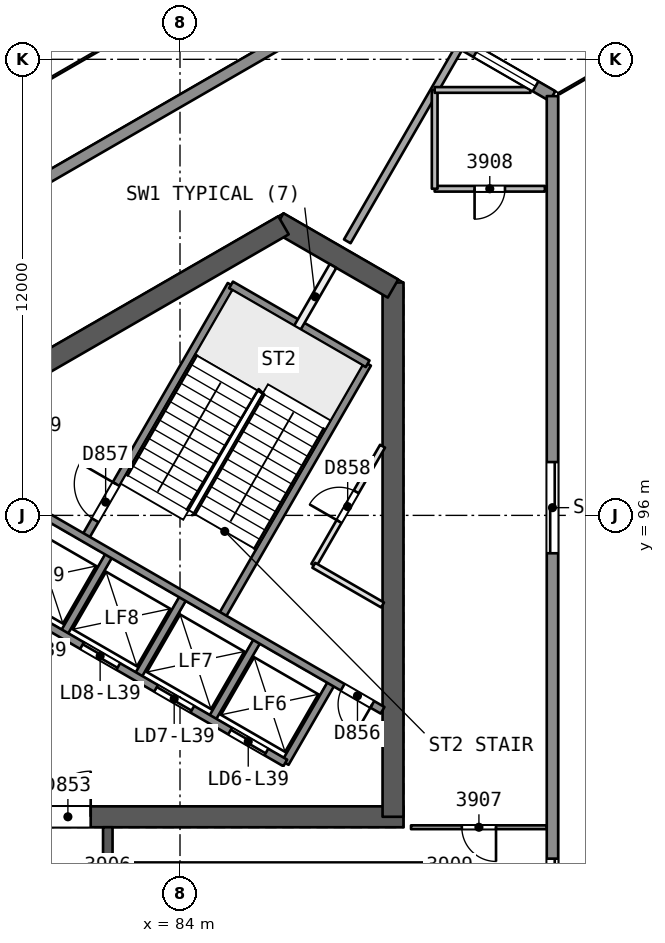
"""IFC4 building model, lengths in metres.
Left out: names, types, materials, properties, quantities, classifications, styles, units other than length and angle.
Written with IfcOpenShell. Run it as: python <this file> out.ifc"""

import sys

from ifc_helpers import new_model, si_unit, direction, frame, frame_2d, origin, place, context, subcontext, project, spatial, rectangle, extrude, element, fill, save


model = new_model("IFC4")
c1 = context("Model", 3, precision=1e-05, world=origin(), true_north=direction((0.0, 1.0)))
c2 = subcontext(c1, "Body", "Model", "MODEL_VIEW")
j1 = project(units=[si_unit("LENGTHUNIT", "METRE"), si_unit("PLANEANGLEUNIT", "RADIAN")], contexts=[c1])
p1 = place(None, origin())
s1 = spatial("IfcSite", under=j1, at=p1, CompositionType="ELEMENT")
p2 = place(p1, origin())
s2 = spatial("IfcBuilding", under=s1, at=p2, CompositionType="ELEMENT")
p3 = place(p2, frame((0.0, 0.0, 163.7)))
s3 = spatial("IfcBuildingStorey", under=s2, at=p3, CompositionType="ELEMENT", Elevation=163.7)
p4 = place(p3, frame((79.659, 88.069, 0.0), z_axis=(0.0, 0.0, 1.0), x_axis=(1.0, 0.0, 0.0)))
e1 = element("IfcWall", 1, at=p4, inside=s3, PredefinedType="SHEAR", context=c2, shape_type="SweptSolid", body=[
    extrude(rectangle(XDim=10.221, YDim=0.55, at=frame_2d((5.111, 0.0))), origin(), (0.0, 0.0, 1.0), 3.7),
])
p5 = place(p4, frame((0.791, 0.0, 0.0)))
e2 = element("IfcOpeningElement", 2, at=p5, cuts=e1, PredefinedType="OPENING", context=c2, shape_type="SweptSolid", body=[
    extrude(rectangle(XDim=1.2, YDim=2.1, at=frame_2d((0.6, 1.05))), frame((0.0, 0.286, 0.0), z_axis=(0.0, -1.0, 0.0), x_axis=(1.0, 0.0, 0.0)), (0.0, 0.0, 1.0), 0.571),
])
p6 = place(p3, frame((89.605, 88.069, 0.0), z_axis=(0.0, 0.0, 1.0), x_axis=(0.0, 1.0, 0.0)))
e3 = element("IfcWall", 3, at=p6, inside=s3, PredefinedType="SHEAR", context=c2, shape_type="SweptSolid", body=[
    extrude(rectangle(XDim=14.058, YDim=0.55, at=frame_2d((7.029, 0.0))), origin(), (0.0, 0.0, 1.0), 3.7),
])
p7 = place(p3, frame((89.605, 101.969, 0.0), z_axis=(0.0, 0.0, 1.0), x_axis=(-0.865997833373, 0.500047750313, 0.0)))
e4 = element("IfcWall", 4, at=p7, inside=s3, PredefinedType="SHEAR", context=c2, shape_type="SweptSolid", body=[
    extrude(rectangle(XDim=3.487, YDim=0.55, at=frame_2d((1.743, 0.0))), origin(), (0.0, 0.0, 1.0), 3.7),
])
p8 = place(p3, frame((86.723, 103.633, 0.0), z_axis=(0.0, 0.0, 1.0), x_axis=(-0.866023530946, -0.500003243837, 0.0)))
e5 = element("IfcWall", 5, at=p8, inside=s3, PredefinedType="SHEAR", context=c2, shape_type="SweptSolid", body=[
    extrude(rectangle(XDim=14.175, YDim=0.55, at=frame_2d((7.087, 0.0))), origin(), (0.0, 0.0, 1.0), 3.7),
])
p9 = place(p3, frame((82.1, 72.206, 0.0), z_axis=(0.0, 0.0, 1.0), x_axis=(0.0, 1.0, 0.0)))
e6 = element("IfcWall", 6, at=p9, inside=s3, PredefinedType="SHEAR", context=c2, shape_type="SweptSolid", body=[
    extrude(rectangle(XDim=15.588, YDim=0.25, at=frame_2d((7.794, 0.0))), origin(), (0.0, 0.0, 1.0), 3.25),
])
p10 = place(p9, frame((2.618, 0.0, 0.0)))
e7 = element("IfcOpeningElement", 7, at=p10, cuts=e6, PredefinedType="OPENING", context=c2, shape_type="SweptSolid", body=[
    extrude(rectangle(XDim=1.0, YDim=2.1, at=frame_2d((0.5, 1.05))), frame((0.0, 0.135, 0.0), z_axis=(0.0, -1.0, 0.0), x_axis=(1.0, 0.0, 0.0)), (0.0, 0.0, 1.0), 0.271),
])
p11 = place(p9, frame((8.285, 0.0, 0.0)))
e8 = element("IfcOpeningElement", 8, at=p11, cuts=e6, PredefinedType="OPENING", context=c2, shape_type="SweptSolid", body=[
    extrude(rectangle(XDim=1.2, YDim=2.4, at=frame_2d((0.6, 1.2))), frame((0.0, 0.135, 0.0), z_axis=(0.0, -1.0, 0.0), x_axis=(1.0, 0.0, 0.0)), (0.0, 0.0, 1.0), 0.271),
])
p12 = place(p9, frame((13.062, 0.0, 0.0)))
e9 = element("IfcOpeningElement", 9, at=p12, cuts=e6, PredefinedType="OPENING", context=c2, shape_type="SweptSolid", body=[
    extrude(rectangle(XDim=1.0, YDim=2.1, at=frame_2d((0.5, 1.05))), frame((0.0, 0.135, 0.0), z_axis=(0.0, -1.0, 0.0), x_axis=(1.0, 0.0, 0.0)), (0.0, 0.0, 1.0), 0.271),
])
p13 = place(p3, frame((93.652, 87.794, 0.0), z_axis=(0.0, 0.0, 1.0), x_axis=(-1.0, 0.0, 0.0)))
e10 = element("IfcWall", 10, at=p13, inside=s3, PredefinedType="PARTITIONING", context=c2, shape_type="SweptSolid", body=[
    extrude(rectangle(XDim=3.573, YDim=0.1, at=frame_2d((1.786, 0.0))), origin(), (0.0, 0.0, 1.0), 3.25),
])
p14 = place(p13, frame((1.336, 0.0, 0.0)))
e11 = element("IfcOpeningElement", 11, at=p14, cuts=e10, PredefinedType="OPENING", context=c2, shape_type="SweptSolid", body=[
    extrude(rectangle(XDim=0.9, YDim=2.1, at=frame_2d((0.45, 1.05))), frame((0.0, 0.061, 0.0), z_axis=(0.0, -1.0, 0.0), x_axis=(1.0, 0.0, 0.0)), (0.0, 0.0, 1.0), 0.121),
])
p15 = place(p3, frame((82.1, 86.768, 0.0), z_axis=(0.0, 0.0, 1.0), x_axis=(1.0, 0.0, 0.0)))
e12 = element("IfcWall", 12, at=p15, inside=s3, PredefinedType="PARTITIONING", context=c2, shape_type="SweptSolid", body=[
    extrude(rectangle(XDim=9.0, YDim=0.2, at=frame_2d((4.5, 0.0))), origin(), (0.0, 0.0, 1.0), 3.25),
])
p16 = place(p3, frame((93.602, 104.594, 0.0), z_axis=(0.0, 0.0, 1.0), x_axis=(-1.0, 0.0, 0.0)))
e13 = element("IfcWall", 13, at=p16, inside=s3, PredefinedType="PARTITIONING", context=c2, shape_type="SweptSolid", body=[
    extrude(rectangle(XDim=2.9, YDim=0.15, at=frame_2d((1.45, 0.0))), origin(), (0.0, 0.0, 1.0), 3.25),
])
p17 = place(p16, frame((1.05, 0.0, 0.0)))
e14 = element("IfcOpeningElement", 14, at=p17, cuts=e13, PredefinedType="OPENING", context=c2, shape_type="SweptSolid", body=[
    extrude(rectangle(XDim=0.8, YDim=2.1, at=frame_2d((0.4, 1.05))), frame((0.0, 0.085, 0.0), z_axis=(0.0, -1.0, 0.0), x_axis=(1.0, 0.0, 0.0)), (0.0, 0.0, 1.0), 0.171),
])
p18 = place(p3, frame((90.702, 104.594, 0.0), z_axis=(0.0, 0.0, 1.0), x_axis=(0.0, 1.0, 0.0)))
e15 = element("IfcWall", 15, at=p18, inside=s3, PredefinedType="PARTITIONING", context=c2, shape_type="SweptSolid", body=[
    extrude(rectangle(XDim=2.6, YDim=0.15, at=frame_2d((1.3, 0.0))), origin(), (0.0, 0.0, 1.0), 3.25),
])
p19 = place(p3, frame((90.702, 107.194, 0.0), z_axis=(0.0, 0.0, 1.0), x_axis=(1.0, 0.0, 0.0)))
e16 = element("IfcWall", 16, at=p19, inside=s3, PredefinedType="PARTITIONING", context=c2, shape_type="SweptSolid", body=[
    extrude(rectangle(XDim=2.521, YDim=0.15, at=frame_2d((1.26, 0.0))), origin(), (0.0, 0.0, 1.0), 3.25),
])
p20 = place(p3, frame((91.332, 108.286, 0.0), z_axis=(0.0, 0.0, 1.0), x_axis=(-0.499988124798, -0.866032259827, 0.0)))
e17 = element("IfcWall", 17, at=p20, inside=s3, PredefinedType="PARTITIONING", context=c2, shape_type="SweptSolid", body=[
    extrude(rectangle(XDim=5.86, YDim=0.2, at=frame_2d((2.93, 0.0))), origin(), (0.0, 0.0, 1.0), 3.25),
])
p21 = place(p3, frame((89.01, 109.798, 0.0), z_axis=(0.0, 0.0, 1.0), x_axis=(0.86602095052, -0.500007713201, 0.0)))
e18 = element("IfcWall", 18, at=p21, inside=s3, PredefinedType="SOLIDWALL", context=c2, shape_type="SweptSolid", body=[
    extrude(rectangle(XDim=5.532, YDim=0.3, at=frame_2d((2.766, 0.0))), origin(), (0.0, 0.0, 1.0), 3.25),
])
p22 = place(p21, frame((3.217, 0.0, 0.9)))
e19 = element("IfcOpeningElement", 19, at=p22, cuts=e18, PredefinedType="OPENING", context=c2, shape_type="SweptSolid", body=[
    extrude(rectangle(XDim=1.8, YDim=1.5, at=frame_2d((0.9, 0.75))), frame((0.0, 0.161, 0.0), z_axis=(0.0, -1.0, 0.0), x_axis=(1.0, 0.0, 0.0)), (0.0, 0.0, 1.0), 0.321),
])
p23 = place(p21, frame((0.44, 0.0, 0.9)))
e20 = element("IfcOpeningElement", 20, at=p23, cuts=e18, PredefinedType="OPENING", context=c2, shape_type="SweptSolid", body=[
    extrude(rectangle(XDim=1.8, YDim=1.5, at=frame_2d((0.9, 0.75))), frame((0.0, 0.161, 0.0), z_axis=(0.0, -1.0, 0.0), x_axis=(1.0, 0.0, 0.0)), (0.0, 0.0, 1.0), 0.321),
])
p24 = place(p3, frame((93.801, 107.032, 0.0), z_axis=(0.0, 0.0, 1.0), x_axis=(0.0, -1.0, 0.0)))
e21 = element("IfcWall", 21, at=p24, inside=s3, PredefinedType="SOLIDWALL", context=c2, shape_type="SweptSolid", body=[
    extrude(rectangle(XDim=54.064, YDim=0.3, at=frame_2d((27.032, 0.0))), origin(), (0.0, 0.0, 1.0), 3.25),
])
p25 = place(p24, frame((30.509, 0.0, 0.0)))
e22 = element("IfcOpeningElement", 22, at=p25, cuts=e21, PredefinedType="OPENING", context=c2, shape_type="SweptSolid", body=[
    extrude(rectangle(XDim=2.4, YDim=2.4, at=frame_2d((1.2, 1.2))), frame((0.0, 0.161, 0.0), z_axis=(0.0, -1.0, 0.0), x_axis=(1.0, 0.0, 0.0)), (0.0, 0.0, 1.0), 0.321),
])
p26 = place(p24, frame((42.011, 0.0, 0.0)))
e23 = element("IfcOpeningElement", 23, at=p26, cuts=e21, PredefinedType="OPENING", context=c2, shape_type="SweptSolid", body=[
    extrude(rectangle(XDim=2.4, YDim=2.4, at=frame_2d((1.2, 1.2))), frame((0.0, 0.161, 0.0), z_axis=(0.0, -1.0, 0.0), x_axis=(1.0, 0.0, 0.0)), (0.0, 0.0, 1.0), 0.321),
])
p27 = place(p24, frame((20.065, 0.0, 0.0)))
e24 = element("IfcOpeningElement", 24, at=p27, cuts=e21, PredefinedType="OPENING", context=c2, shape_type="SweptSolid", body=[
    extrude(rectangle(XDim=2.4, YDim=2.4, at=frame_2d((1.2, 1.2))), frame((0.0, 0.161, 0.0), z_axis=(0.0, -1.0, 0.0), x_axis=(1.0, 0.0, 0.0)), (0.0, 0.0, 1.0), 0.321),
])
p28 = place(p24, frame((9.629, 0.0, 0.0)))
e25 = element("IfcOpeningElement", 25, at=p28, cuts=e21, PredefinedType="OPENING", context=c2, shape_type="SweptSolid", body=[
    extrude(rectangle(XDim=2.4, YDim=2.4, at=frame_2d((1.2, 1.2))), frame((0.0, 0.161, 0.0), z_axis=(0.0, -1.0, 0.0), x_axis=(1.0, 0.0, 0.0)), (0.0, 0.0, 1.0), 0.321),
])
p29 = place(p24, frame((25.041, 0.0, 0.9)))
e26 = element("IfcOpeningElement", 26, at=p29, cuts=e21, PredefinedType="OPENING", context=c2, shape_type="SweptSolid", body=[
    extrude(rectangle(XDim=1.8, YDim=1.5, at=frame_2d((0.9, 0.75))), frame((0.0, 0.161, 0.0), z_axis=(0.0, -1.0, 0.0), x_axis=(1.0, 0.0, 0.0)), (0.0, 0.0, 1.0), 0.321),
])
p30 = place(p3, frame((42.189, 82.766, 0.0), z_axis=(0.0, 0.0, 1.0), x_axis=(0.866025862562, 0.499999205373, 0.0)))
e27 = element("IfcWall", 27, at=p30, inside=s3, PredefinedType="SOLIDWALL", context=c2, shape_type="SweptSolid", body=[
    extrude(rectangle(XDim=54.064, YDim=0.3, at=frame_2d((27.032, 0.0))), origin(), (0.0, 0.0, 1.0), 3.25),
])
p31 = place(p30, frame((20.688, 0.0, 0.0)))
e28 = element("IfcOpeningElement", 28, at=p31, cuts=e27, PredefinedType="OPENING", context=c2, shape_type="SweptSolid", body=[
    extrude(rectangle(XDim=2.4, YDim=2.4, at=frame_2d((1.2, 1.2))), frame((0.0, 0.161, 0.0), z_axis=(0.0, -1.0, 0.0), x_axis=(1.0, 0.0, 0.0)), (0.0, 0.0, 1.0), 0.321),
])
p32 = place(p30, frame((9.629, 0.0, 0.0)))
e29 = element("IfcOpeningElement", 29, at=p32, cuts=e27, PredefinedType="OPENING", context=c2, shape_type="SweptSolid", body=[
    extrude(rectangle(XDim=2.4, YDim=2.4, at=frame_2d((1.2, 1.2))), frame((0.0, 0.161, 0.0), z_axis=(0.0, -1.0, 0.0), x_axis=(1.0, 0.0, 0.0)), (0.0, 0.0, 1.0), 0.321),
])
p33 = place(p30, frame((40.951, 0.0, 0.0)))
e30 = element("IfcOpeningElement", 30, at=p33, cuts=e27, PredefinedType="OPENING", context=c2, shape_type="SweptSolid", body=[
    extrude(rectangle(XDim=2.4, YDim=2.4, at=frame_2d((1.2, 1.2))), frame((0.0, 0.161, 0.0), z_axis=(0.0, -1.0, 0.0), x_axis=(1.0, 0.0, 0.0)), (0.0, 0.0, 1.0), 0.321),
])
p34 = place(p30, frame((27.847, 0.0, 0.9)))
e31 = element("IfcOpeningElement", 31, at=p34, cuts=e27, PredefinedType="OPENING", context=c2, shape_type="SweptSolid", body=[
    extrude(rectangle(XDim=1.8, YDim=1.5, at=frame_2d((0.9, 0.75))), frame((0.0, 0.161, 0.0), z_axis=(0.0, -1.0, 0.0), x_axis=(1.0, 0.0, 0.0)), (0.0, 0.0, 1.0), 0.321),
])
p35 = place(p30, frame((25.041, 0.0, 0.9)))
e32 = element("IfcOpeningElement", 32, at=p35, cuts=e27, PredefinedType="OPENING", context=c2, shape_type="SweptSolid", body=[
    extrude(rectangle(XDim=1.8, YDim=1.5, at=frame_2d((0.9, 0.75))), frame((0.0, 0.161, 0.0), z_axis=(0.0, -1.0, 0.0), x_axis=(1.0, 0.0, 0.0)), (0.0, 0.0, 1.0), 0.321),
])
p36 = place(p3, frame((86.77, 89.486, 0.0), z_axis=(0.0, 0.0, 1.0), x_axis=(0.499961042966, 0.86604789447, 0.0)))
e33 = element("IfcWall", 33, at=p36, inside=s3, PredefinedType="SOLIDWALL", context=c2, shape_type="SweptSolid", body=[
    extrude(rectangle(XDim=2.48, YDim=0.2, at=frame_2d((1.24, 0.0))), origin(), (0.0, 0.0, 1.0), 3.25),
])
p37 = place(p3, frame((87.521, 94.687, 0.0), z_axis=(0.0, 0.0, 1.0), x_axis=(0.500043727655, 0.866000156139, 0.0)))
e34 = element("IfcWall", 34, at=p37, inside=s3, PredefinedType="PARTITIONING", context=c2, shape_type="SweptSolid", body=[
    extrude(rectangle(XDim=3.618, YDim=0.15, at=frame_2d((1.809, 0.0))), origin(), (0.0, 0.0, 1.0), 3.25),
])
p38 = place(p37, frame((1.332, 0.0, 0.0)))
e35 = element("IfcOpeningElement", 35, at=p38, cuts=e34, PredefinedType="OPENING", context=c2, shape_type="SweptSolid", body=[
    extrude(rectangle(XDim=0.9, YDim=2.1, at=frame_2d((0.45, 1.05))), frame((0.0, 0.085, 0.0), z_axis=(0.0, -1.0, 0.0), x_axis=(1.0, 0.0, 0.0)), (0.0, 0.0, 1.0), 0.171),
])
p39 = place(p3, frame((84.821, 90.611, 0.0), z_axis=(0.0, 0.0, 1.0), x_axis=(0.499961042966, 0.86604789447, 0.0)))
e36 = element("IfcWall", 36, at=p39, inside=s3, PredefinedType="SOLIDWALL", context=c2, shape_type="SweptSolid", body=[
    extrude(rectangle(XDim=2.48, YDim=0.2, at=frame_2d((1.24, 0.0))), origin(), (0.0, 0.0, 1.0), 3.25),
])
p40 = place(p3, frame((85.087, 93.321, 0.0), z_axis=(0.0, 0.0, 1.0), x_axis=(0.500019787375, 0.866013979237, 0.0)))
e37 = element("IfcWall", 37, at=p40, inside=s3, PredefinedType="SOLIDWALL", context=c2, shape_type="SweptSolid", body=[
    extrude(rectangle(XDim=7.7, YDim=0.2, at=frame_2d((3.85, 0.0))), origin(), (0.0, 0.0, 1.0), 3.25),
])
p41 = place(p3, frame((82.873, 91.736, 0.0), z_axis=(0.0, 0.0, 1.0), x_axis=(0.499961042966, 0.86604789447, 0.0)))
e38 = element("IfcWall", 38, at=p41, inside=s3, PredefinedType="SOLIDWALL", context=c2, shape_type="SweptSolid", body=[
    extrude(rectangle(XDim=2.48, YDim=0.2, at=frame_2d((1.24, 0.0))), origin(), (0.0, 0.0, 1.0), 3.25),
])
p42 = place(p3, frame((87.09, 100.94, 0.0), z_axis=(0.0, 0.0, 1.0), x_axis=(0.499951854219, 0.86605319898, 0.0)))
e39 = element("IfcWall", 39, at=p42, inside=s3, PredefinedType="PARTITIONING", context=c2, shape_type="SweptSolid", body=[
    extrude(rectangle(XDim=1.873, YDim=0.2, at=frame_2d((0.937, 0.0))), origin(), (0.0, 0.0, 1.0), 3.25),
])
p43 = place(p3, frame((80.924, 92.861, 0.0), z_axis=(0.0, 0.0, 1.0), x_axis=(0.499961042966, 0.86604789447, 0.0)))
e40 = element("IfcWall", 40, at=p43, inside=s3, PredefinedType="SOLIDWALL", context=c2, shape_type="SweptSolid", body=[
    extrude(rectangle(XDim=2.48, YDim=0.2, at=frame_2d((1.24, 0.0))), origin(), (0.0, 0.0, 1.0), 3.25),
])
p44 = place(p3, frame((81.493, 95.396, 0.0), z_axis=(0.0, 0.0, 1.0), x_axis=(0.500006057782, 0.866021906294, 0.0)))
e41 = element("IfcWall", 41, at=p44, inside=s3, PredefinedType="SOLIDWALL", context=c2, shape_type="SweptSolid", body=[
    extrude(rectangle(XDim=7.7, YDim=0.2, at=frame_2d((3.85, 0.0))), origin(), (0.0, 0.0, 1.0), 3.25),
])
p45 = place(p44, frame((0.55, 0.0, 0.0)))
e42 = element("IfcOpeningElement", 42, at=p45, cuts=e41, PredefinedType="OPENING", context=c2, shape_type="SweptSolid", body=[
    extrude(rectangle(XDim=1.1, YDim=2.1, at=frame_2d((0.55, 1.05))), frame((0.0, 0.11, 0.0), z_axis=(0.0, -1.0, 0.0), x_axis=(1.0, 0.0, 0.0)), (0.0, 0.0, 1.0), 0.221),
])
p46 = place(p3, frame((86.77, 89.486, 0.0), z_axis=(0.0, 0.0, 1.0), x_axis=(-0.86601811187, 0.500012629753, 0.0)))
e43 = element("IfcWall", 43, at=p46, inside=s3, PredefinedType="SOLIDWALL", context=c2, shape_type="SweptSolid", body=[
    extrude(rectangle(XDim=10.9, YDim=0.2, at=frame_2d((5.45, 0.0))), origin(), (0.0, 0.0, 1.0), 3.25),
])
p47 = place(p46, frame((0.575, 0.0, 0.0)))
e44 = element("IfcOpeningElement", 44, at=p47, cuts=e43, PredefinedType="OPENING", context=c2, shape_type="SweptSolid", body=[
    extrude(rectangle(XDim=1.1, YDim=2.1, at=frame_2d((0.55, 1.05))), frame((0.0, 0.11, 0.0), z_axis=(0.0, -1.0, 0.0), x_axis=(1.0, 0.0, 0.0)), (0.0, 0.0, 1.0), 0.221),
])
p48 = place(p46, frame((2.825, 0.0, 0.0)))
e45 = element("IfcOpeningElement", 45, at=p48, cuts=e43, PredefinedType="OPENING", context=c2, shape_type="SweptSolid", body=[
    extrude(rectangle(XDim=1.1, YDim=2.1, at=frame_2d((0.55, 1.05))), frame((0.0, 0.11, 0.0), z_axis=(0.0, -1.0, 0.0), x_axis=(1.0, 0.0, 0.0)), (0.0, 0.0, 1.0), 0.221),
])
p49 = place(p46, frame((5.075, 0.0, 0.0)))
e46 = element("IfcOpeningElement", 46, at=p49, cuts=e43, PredefinedType="OPENING", context=c2, shape_type="SweptSolid", body=[
    extrude(rectangle(XDim=1.1, YDim=2.1, at=frame_2d((0.55, 1.05))), frame((0.0, 0.11, 0.0), z_axis=(0.0, -1.0, 0.0), x_axis=(1.0, 0.0, 0.0)), (0.0, 0.0, 1.0), 0.221),
])
p50 = place(p46, frame((7.325, 0.0, 0.0)))
e47 = element("IfcOpeningElement", 47, at=p50, cuts=e43, PredefinedType="OPENING", context=c2, shape_type="SweptSolid", body=[
    extrude(rectangle(XDim=1.1, YDim=2.1, at=frame_2d((0.55, 1.05))), frame((0.0, 0.11, 0.0), z_axis=(0.0, -1.0, 0.0), x_axis=(1.0, 0.0, 0.0)), (0.0, 0.0, 1.0), 0.221),
])
p51 = place(p3, frame((89.33, 90.872, 0.0), z_axis=(0.0, 0.0, 1.0), x_axis=(-0.866027589512, 0.49999621419, 0.0)))
e48 = element("IfcWall", 48, at=p51, inside=s3, PredefinedType="SOLIDWALL", context=c2, shape_type="SweptSolid", body=[
    extrude(rectangle(XDim=10.524, YDim=0.2, at=frame_2d((5.262, 0.0))), origin(), (0.0, 0.0, 1.0), 3.25),
])
p52 = place(p51, frame((0.312, 0.0, 0.0)))
e49 = element("IfcOpeningElement", 49, at=p52, cuts=e48, PredefinedType="OPENING", context=c2, shape_type="SweptSolid", body=[
    extrude(rectangle(XDim=0.9, YDim=2.1, at=frame_2d((0.45, 1.05))), frame((0.0, 0.11, 0.0), z_axis=(0.0, -1.0, 0.0), x_axis=(1.0, 0.0, 0.0)), (0.0, 0.0, 1.0), 0.221),
])
p53 = place(p3, frame((89.33, 93.643, 0.0), z_axis=(0.0, 0.0, 1.0), x_axis=(-0.866033778982, 0.499985493453, 0.0)))
e50 = element("IfcWall", 50, at=p53, inside=s3, PredefinedType="PARTITIONING", context=c2, shape_type="SweptSolid", body=[
    extrude(rectangle(XDim=2.089, YDim=0.15, at=frame_2d((1.044, 0.0))), origin(), (0.0, 0.0, 1.0), 3.25),
])
p54 = place(p3, frame((88.937, 99.99, 0.0), z_axis=(0.0, 0.0, 1.0), x_axis=(-0.866004344652, 0.500036473714, 0.0)))
e51 = element("IfcWall", 51, at=p54, inside=s3, PredefinedType="SOLIDWALL", context=c2, shape_type="SweptSolid", body=[
    extrude(rectangle(XDim=4.15, YDim=0.2, at=frame_2d((2.075, 0.0))), origin(), (0.0, 0.0, 1.0), 3.25),
])
p55 = place(p14, origin())
e52 = element("IfcDoor", 52, at=p55, inside=s3, OperationType="SINGLE_SWING_LEFT", PredefinedType="NOTDEFINED", context=c2, shape_type="SweptSolid", body=[
    extrude(rectangle(XDim=0.9, YDim=2.1, at=frame_2d((0.45, 1.05))), frame((0.0, 0.025, 0.0), z_axis=(0.0, -1.0, 0.0), x_axis=(1.0, 0.0, 0.0)), (0.0, 0.0, 1.0), 0.05),
])
fill(e11, e52)
p56 = place(p17, origin())
e53 = element("IfcDoor", 53, at=p56, inside=s3, OperationType="SINGLE_SWING_RIGHT", PredefinedType="NOTDEFINED", context=c2, shape_type="SweptSolid", body=[
    extrude(rectangle(XDim=0.8, YDim=2.1, at=frame_2d((0.4, 1.05))), frame((0.0, 0.025, 0.0), z_axis=(0.0, -1.0, 0.0), x_axis=(1.0, 0.0, 0.0)), (0.0, 0.0, 1.0), 0.05),
])
fill(e14, e53)
p57 = place(p22, origin())
e54 = element("IfcWindow", 54, at=p57, inside=s3, PartitioningType="SINGLE_PANEL", PredefinedType="WINDOW", context=c2, shape_type="SweptSolid", body=[
    extrude(rectangle(XDim=1.8, YDim=1.5, at=frame_2d((0.9, 0.75))), frame((0.0, 0.03, 0.0), z_axis=(0.0, -1.0, 0.0), x_axis=(1.0, 0.0, 0.0)), (0.0, 0.0, 1.0), 0.06),
])
fill(e19, e54)
p58 = place(p27, origin())
e55 = element("IfcDoor", 55, at=p58, inside=s3, OperationType="SLIDING_TO_LEFT", PredefinedType="NOTDEFINED", context=c2, shape_type="SweptSolid", body=[
    extrude(rectangle(XDim=2.4, YDim=2.4, at=frame_2d((1.2, 1.2))), frame((0.0, 0.025, 0.0), z_axis=(0.0, -1.0, 0.0), x_axis=(1.0, 0.0, 0.0)), (0.0, 0.0, 1.0), 0.05),
])
fill(e24, e55)
p59 = place(p28, origin())
e56 = element("IfcDoor", 56, at=p59, inside=s3, OperationType="SLIDING_TO_RIGHT", PredefinedType="NOTDEFINED", context=c2, shape_type="SweptSolid", body=[
    extrude(rectangle(XDim=2.4, YDim=2.4, at=frame_2d((1.2, 1.2))), frame((0.0, 0.025, 0.0), z_axis=(0.0, -1.0, 0.0), x_axis=(1.0, 0.0, 0.0)), (0.0, 0.0, 1.0), 0.05),
])
fill(e25, e56)
p60 = place(p5, origin())
e57 = element("IfcDoor", 57, at=p60, inside=s3, OperationType="SINGLE_SWING_RIGHT", PredefinedType="NOTDEFINED", context=c2, shape_type="SweptSolid", body=[
    extrude(rectangle(XDim=1.2, YDim=2.1, at=frame_2d((0.6, 1.05))), frame((0.0, 0.025, 0.0), z_axis=(0.0, -1.0, 0.0), x_axis=(1.0, 0.0, 0.0)), (0.0, 0.0, 1.0), 0.05),
])
fill(e2, e57)
p61 = place(p47, origin())
e58 = element("IfcDoor", 58, at=p61, inside=s3, OperationType="SLIDING_TO_RIGHT", PredefinedType="NOTDEFINED", context=c2, shape_type="SweptSolid", body=[
    extrude(rectangle(XDim=1.1, YDim=2.1, at=frame_2d((0.55, 1.05))), frame((0.0, 0.025, 0.0), z_axis=(0.0, -1.0, 0.0), x_axis=(1.0, 0.0, 0.0)), (0.0, 0.0, 1.0), 0.05),
])
fill(e44, e58)
p62 = place(p48, origin())
e59 = element("IfcDoor", 59, at=p62, inside=s3, OperationType="SLIDING_TO_LEFT", PredefinedType="NOTDEFINED", context=c2, shape_type="SweptSolid", body=[
    extrude(rectangle(XDim=1.1, YDim=2.1, at=frame_2d((0.55, 1.05))), frame((0.0, 0.025, 0.0), z_axis=(0.0, -1.0, 0.0), x_axis=(1.0, 0.0, 0.0)), (0.0, 0.0, 1.0), 0.05),
])
fill(e45, e59)
p63 = place(p49, origin())
e60 = element("IfcDoor", 60, at=p63, inside=s3, OperationType="SLIDING_TO_RIGHT", PredefinedType="NOTDEFINED", context=c2, shape_type="SweptSolid", body=[
    extrude(rectangle(XDim=1.1, YDim=2.1, at=frame_2d((0.55, 1.05))), frame((0.0, 0.025, 0.0), z_axis=(0.0, -1.0, 0.0), x_axis=(1.0, 0.0, 0.0)), (0.0, 0.0, 1.0), 0.05),
])
fill(e46, e60)
p64 = place(p52, origin())
e61 = element("IfcDoor", 61, at=p64, inside=s3, OperationType="SINGLE_SWING_LEFT", PredefinedType="NOTDEFINED", context=c2, shape_type="SweptSolid", body=[
    extrude(rectangle(XDim=0.9, YDim=2.1, at=frame_2d((0.45, 1.05))), frame((0.0, 0.025, 0.0), z_axis=(0.0, -1.0, 0.0), x_axis=(1.0, 0.0, 0.0)), (0.0, 0.0, 1.0), 0.05),
])
fill(e49, e61)
p65 = place(p45, origin())
e62 = element("IfcDoor", 62, at=p65, inside=s3, OperationType="SINGLE_SWING_RIGHT", PredefinedType="NOTDEFINED", context=c2, shape_type="SweptSolid", body=[
    extrude(rectangle(XDim=1.1, YDim=2.1, at=frame_2d((0.55, 1.05))), frame((0.0, 0.025, 0.0), z_axis=(0.0, -1.0, 0.0), x_axis=(1.0, 0.0, 0.0)), (0.0, 0.0, 1.0), 0.05),
])
fill(e42, e62)
p66 = place(p38, origin())
e63 = element("IfcDoor", 63, at=p66, inside=s3, OperationType="SINGLE_SWING_LEFT", PredefinedType="NOTDEFINED", context=c2, shape_type="SweptSolid", body=[
    extrude(rectangle(XDim=0.9, YDim=2.1, at=frame_2d((0.45, 1.05))), frame((0.0, 0.025, 0.0), z_axis=(0.0, -1.0, 0.0), x_axis=(1.0, 0.0, 0.0)), (0.0, 0.0, 1.0), 0.05),
])
fill(e35, e63)
save(model, sys.argv[1])
